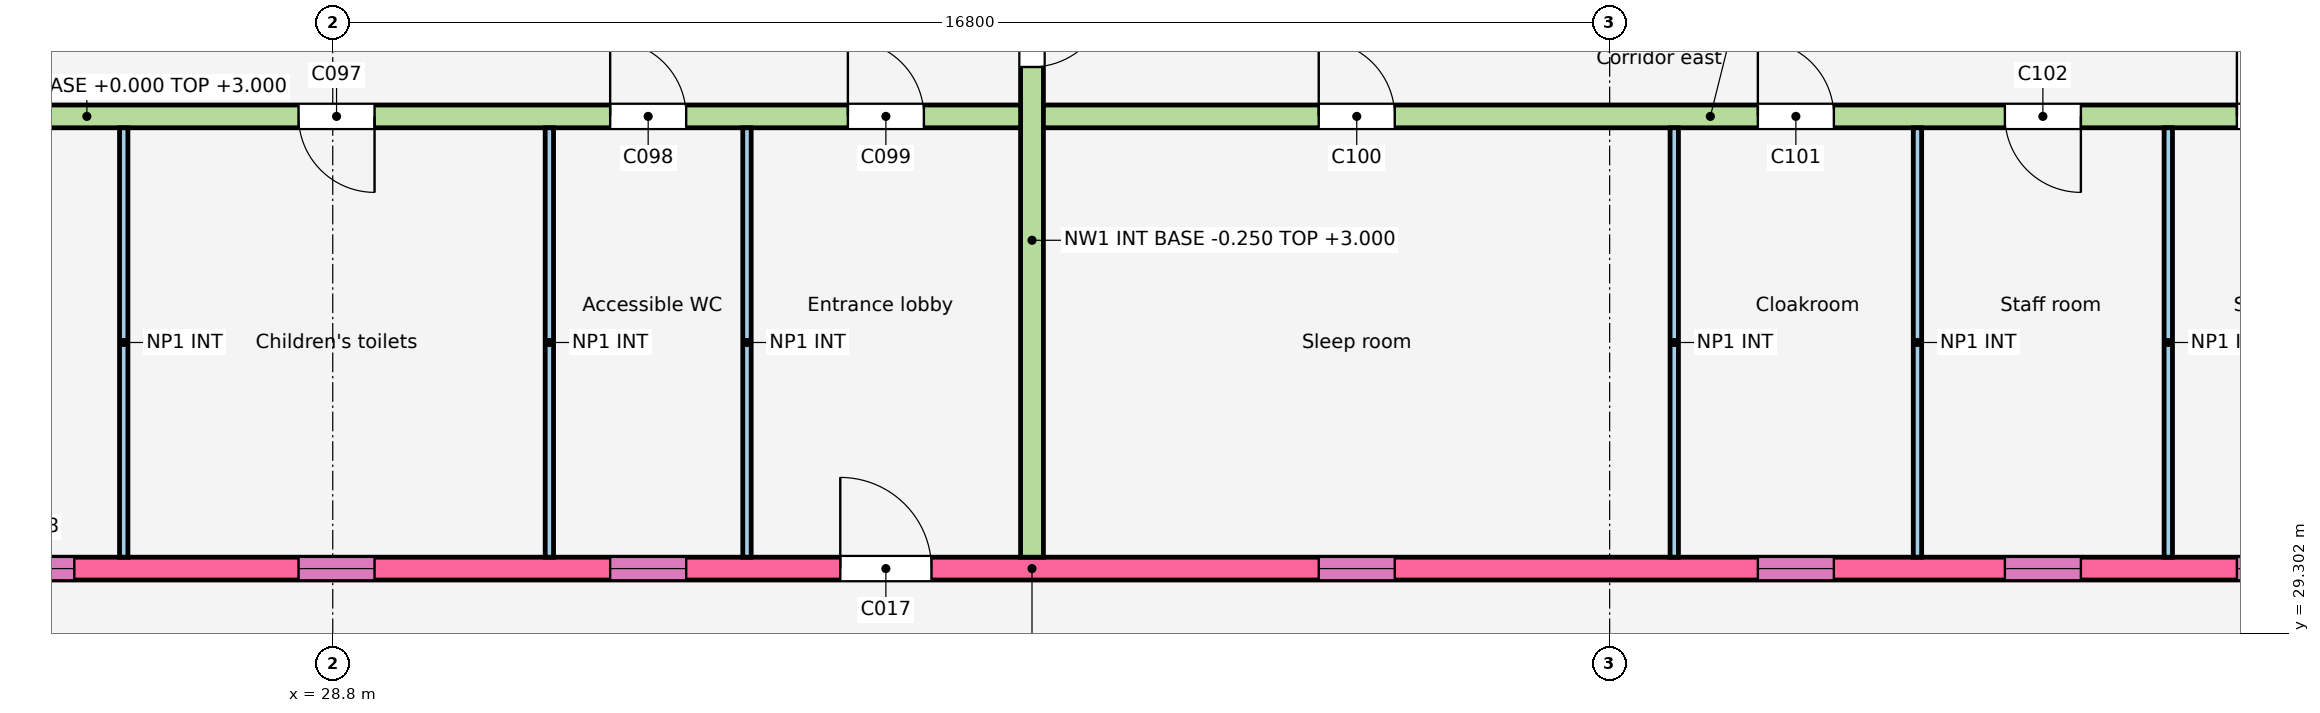
"""IFC4 building model, lengths in metres.
Left out: names, types, materials, properties, quantities, classifications, styles, units other than length and angle.
Written with IfcOpenShell. Run it as: python <this file> out.ifc"""

import sys

from ifc_helpers import new_model, si_unit, direction, frame, frame_2d, origin, place, context, subcontext, project, spatial, polyline, rectangle, outline, extrude, element, fill, save


model = new_model("IFC4")
c1 = context("Model", 3, precision=1e-05, world=origin(), true_north=direction((0.0, 1.0)))
c2 = subcontext(c1, "Body", "Model", "MODEL_VIEW")
j1 = project(units=[si_unit("LENGTHUNIT", "METRE"), si_unit("PLANEANGLEUNIT", "RADIAN")], contexts=[c1])
p1 = place(None, origin())
s1 = spatial("IfcSite", under=j1, at=p1, CompositionType="ELEMENT")
p2 = place(p1, origin())
s2 = spatial("IfcBuilding", under=s1, at=p2, CompositionType="ELEMENT")
p3 = place(p2, origin())
s3 = spatial("IfcBuildingStorey", under=s2, at=p3, CompositionType="ELEMENT", Elevation=0.0)
p4 = place(p3, frame((20.0, 30.15, -0.25), z_axis=(0.0, 0.0, 1.0), x_axis=(1.0, 0.0, 0.0)))
e1 = element("IfcWall", 1, at=p4, inside=s3, PredefinedType="SOLIDWALL", context=c2, shape_type="SweptSolid", body=[
    extrude(outline(polyline([(0.0, 0.0), (36.0, 0.0), (36.0, 3.247), (35.85, 3.247), (27.425, 7.176), (26.425, 7.176), (18.0, 3.247), (9.575, 7.176), (8.575, 7.176), (0.15, 3.247), (0.0, 3.247), (0.0, 0.0)])), frame((0.0, 0.15, 0.0), z_axis=(0.0, -1.0, 0.0), x_axis=(1.0, 0.0, 0.0)), (0.0, 0.0, 1.0), 0.3),
])
p5 = place(p4, frame((2.0, 0.0, 0.25)))
e2 = element("IfcOpeningElement", 2, at=p5, cuts=e1, PredefinedType="OPENING", context=c2, shape_type="SweptSolid", body=[
    extrude(rectangle(XDim=1.0, YDim=2.1, at=frame_2d((0.5, 1.05))), frame((0.0, 0.16, 0.0), z_axis=(0.0, -1.0, 0.0), x_axis=(1.0, 0.0, 0.0)), (0.0, 0.0, 1.0), 0.32),
])
p6 = place(p4, frame((4.4, 0.0, 1.45)))
e3 = element("IfcOpeningElement", 3, at=p6, cuts=e1, PredefinedType="OPENING", context=c2, shape_type="SweptSolid", body=[
    extrude(rectangle(XDim=1.0, YDim=0.9, at=frame_2d((0.5, 0.45))), frame((0.0, 0.16, 0.0), z_axis=(0.0, -1.0, 0.0), x_axis=(1.0, 0.0, 0.0)), (0.0, 0.0, 1.0), 0.32),
])
p7 = place(p4, frame((8.35, 0.0, 1.45)))
e4 = element("IfcOpeningElement", 4, at=p7, cuts=e1, PredefinedType="OPENING", context=c2, shape_type="SweptSolid", body=[
    extrude(rectangle(XDim=1.0, YDim=0.9, at=frame_2d((0.5, 0.45))), frame((0.0, 0.16, 0.0), z_axis=(0.0, -1.0, 0.0), x_axis=(1.0, 0.0, 0.0)), (0.0, 0.0, 1.0), 0.32),
])
p8 = place(p4, frame((12.45, 0.0, 1.45)))
e5 = element("IfcOpeningElement", 5, at=p8, cuts=e1, PredefinedType="OPENING", context=c2, shape_type="SweptSolid", body=[
    extrude(rectangle(XDim=1.0, YDim=0.9, at=frame_2d((0.5, 0.45))), frame((0.0, 0.16, 0.0), z_axis=(0.0, -1.0, 0.0), x_axis=(1.0, 0.0, 0.0)), (0.0, 0.0, 1.0), 0.32),
])
p9 = place(p4, frame((15.478, 0.0, 0.25)))
e6 = element("IfcOpeningElement", 6, at=p9, cuts=e1, PredefinedType="OPENING", context=c2, shape_type="SweptSolid", body=[
    extrude(rectangle(XDim=1.2, YDim=2.1, at=frame_2d((0.6, 1.05))), frame((0.0, 0.16, 0.0), z_axis=(0.0, -1.0, 0.0), x_axis=(1.0, 0.0, 0.0)), (0.0, 0.0, 1.0), 0.32),
])
p10 = place(p4, frame((21.772, 0.0, 1.45)))
e7 = element("IfcOpeningElement", 7, at=p10, cuts=e1, PredefinedType="OPENING", context=c2, shape_type="SweptSolid", body=[
    extrude(rectangle(XDim=1.0, YDim=0.9, at=frame_2d((0.5, 0.45))), frame((0.0, 0.16, 0.0), z_axis=(0.0, -1.0, 0.0), x_axis=(1.0, 0.0, 0.0)), (0.0, 0.0, 1.0), 0.32),
])
p11 = place(p4, frame((27.55, 0.0, 1.45)))
e8 = element("IfcOpeningElement", 8, at=p11, cuts=e1, PredefinedType="OPENING", context=c2, shape_type="SweptSolid", body=[
    extrude(rectangle(XDim=1.0, YDim=0.9, at=frame_2d((0.5, 0.45))), frame((0.0, 0.16, 0.0), z_axis=(0.0, -1.0, 0.0), x_axis=(1.0, 0.0, 0.0)), (0.0, 0.0, 1.0), 0.32),
])
p12 = place(p4, frame((30.8, 0.0, 1.45)))
e9 = element("IfcOpeningElement", 9, at=p12, cuts=e1, PredefinedType="OPENING", context=c2, shape_type="SweptSolid", body=[
    extrude(rectangle(XDim=1.0, YDim=0.9, at=frame_2d((0.5, 0.45))), frame((0.0, 0.16, 0.0), z_axis=(0.0, -1.0, 0.0), x_axis=(1.0, 0.0, 0.0)), (0.0, 0.0, 1.0), 0.32),
])
p13 = place(p4, frame((33.853, 0.0, 1.45)))
e10 = element("IfcOpeningElement", 10, at=p13, cuts=e1, PredefinedType="OPENING", context=c2, shape_type="SweptSolid", body=[
    extrude(rectangle(XDim=1.0, YDim=0.9, at=frame_2d((0.5, 0.45))), frame((0.0, 0.16, 0.0), z_axis=(0.0, -1.0, 0.0), x_axis=(1.0, 0.0, 0.0)), (0.0, 0.0, 1.0), 0.32),
])
p14 = place(p3, frame((38.0, 30.3, -0.25), z_axis=(0.0, 0.0, 1.0), x_axis=(0.0, 1.0, 0.0)))
e11 = element("IfcWall", 11, at=p14, inside=s3, PredefinedType="SOLIDWALL", context=c2, shape_type="SweptSolid", body=[
    extrude(rectangle(XDim=13.9, YDim=0.3, at=frame_2d((6.95, 0.0))), origin(), (0.0, 0.0, 1.0), 3.25),
])
p15 = place(p14, frame((6.45, 0.0, 0.25)))
e12 = element("IfcOpeningElement", 12, at=p15, cuts=e11, PredefinedType="OPENING", context=c2, shape_type="SweptSolid", body=[
    extrude(rectangle(XDim=1.0, YDim=2.1, at=frame_2d((0.5, 1.05))), frame((0.0, 0.16, 0.0), z_axis=(0.0, -1.0, 0.0), x_axis=(1.0, 0.0, 0.0)), (0.0, 0.0, 1.0), 0.32),
])
p16 = place(p3, frame((20.3, 36.1, 0.0), z_axis=(0.0, 0.0, 1.0), x_axis=(1.0, 0.0, 0.0)))
e13 = element("IfcWall", 13, at=p16, inside=s3, PredefinedType="SOLIDWALL", context=c2, shape_type="SweptSolid", body=[
    extrude(rectangle(XDim=17.55, YDim=0.3, at=frame_2d((8.775, 0.0))), origin(), (0.0, 0.0, 1.0), 3.0),
])
p17 = place(p16, frame((2.347, 0.0, 0.0)))
e14 = element("IfcOpeningElement", 14, at=p17, cuts=e13, PredefinedType="OPENING", context=c2, shape_type="SweptSolid", body=[
    extrude(rectangle(XDim=1.0, YDim=2.1, at=frame_2d((0.5, 1.05))), frame((0.0, 0.16, 0.0), z_axis=(0.0, -1.0, 0.0), x_axis=(1.0, 0.0, 0.0)), (0.0, 0.0, 1.0), 0.32),
])
p18 = place(p16, frame((8.05, 0.0, 0.0)))
e15 = element("IfcOpeningElement", 15, at=p18, cuts=e13, PredefinedType="OPENING", context=c2, shape_type="SweptSolid", body=[
    extrude(rectangle(XDim=1.0, YDim=2.1, at=frame_2d((0.5, 1.05))), frame((0.0, 0.16, 0.0), z_axis=(0.0, -1.0, 0.0), x_axis=(1.0, 0.0, 0.0)), (0.0, 0.0, 1.0), 0.32),
])
p19 = place(p16, frame((12.15, 0.0, 0.0)))
e16 = element("IfcOpeningElement", 16, at=p19, cuts=e13, PredefinedType="OPENING", context=c2, shape_type="SweptSolid", body=[
    extrude(rectangle(XDim=1.0, YDim=2.1, at=frame_2d((0.5, 1.05))), frame((0.0, 0.16, 0.0), z_axis=(0.0, -1.0, 0.0), x_axis=(1.0, 0.0, 0.0)), (0.0, 0.0, 1.0), 0.32),
])
p20 = place(p16, frame((15.278, 0.0, 0.0)))
e17 = element("IfcOpeningElement", 17, at=p20, cuts=e13, PredefinedType="OPENING", context=c2, shape_type="SweptSolid", body=[
    extrude(rectangle(XDim=1.0, YDim=2.1, at=frame_2d((0.5, 1.05))), frame((0.0, 0.16, 0.0), z_axis=(0.0, -1.0, 0.0), x_axis=(1.0, 0.0, 0.0)), (0.0, 0.0, 1.0), 0.32),
])
p21 = place(p3, frame((38.15, 36.1, 0.0), z_axis=(0.0, 0.0, 1.0), x_axis=(1.0, 0.0, 0.0)))
e18 = element("IfcWall", 18, at=p21, inside=s3, PredefinedType="SOLIDWALL", context=c2, shape_type="SweptSolid", body=[
    extrude(rectangle(XDim=17.55, YDim=0.3, at=frame_2d((8.775, 0.0))), origin(), (0.0, 0.0, 1.0), 3.0),
])
p22 = place(p21, frame((3.623, 0.0, 0.0)))
e19 = element("IfcOpeningElement", 19, at=p22, cuts=e18, PredefinedType="OPENING", context=c2, shape_type="SweptSolid", body=[
    extrude(rectangle(XDim=1.0, YDim=2.1, at=frame_2d((0.5, 1.05))), frame((0.0, 0.16, 0.0), z_axis=(0.0, -1.0, 0.0), x_axis=(1.0, 0.0, 0.0)), (0.0, 0.0, 1.0), 0.32),
])
p23 = place(p21, frame((9.4, 0.0, 0.0)))
e20 = element("IfcOpeningElement", 20, at=p23, cuts=e18, PredefinedType="OPENING", context=c2, shape_type="SweptSolid", body=[
    extrude(rectangle(XDim=1.0, YDim=2.1, at=frame_2d((0.5, 1.05))), frame((0.0, 0.16, 0.0), z_axis=(0.0, -1.0, 0.0), x_axis=(1.0, 0.0, 0.0)), (0.0, 0.0, 1.0), 0.32),
])
p24 = place(p21, frame((12.65, 0.0, 0.0)))
e21 = element("IfcOpeningElement", 21, at=p24, cuts=e18, PredefinedType="OPENING", context=c2, shape_type="SweptSolid", body=[
    extrude(rectangle(XDim=1.0, YDim=2.1, at=frame_2d((0.5, 1.05))), frame((0.0, 0.16, 0.0), z_axis=(0.0, -1.0, 0.0), x_axis=(1.0, 0.0, 0.0)), (0.0, 0.0, 1.0), 0.32),
])
p25 = place(p21, frame((15.702, 0.0, 0.0)))
e22 = element("IfcOpeningElement", 22, at=p25, cuts=e18, PredefinedType="OPENING", context=c2, shape_type="SweptSolid", body=[
    extrude(rectangle(XDim=1.0, YDim=2.1, at=frame_2d((0.5, 1.05))), frame((0.0, 0.16, 0.0), z_axis=(0.0, -1.0, 0.0), x_axis=(1.0, 0.0, 0.0)), (0.0, 0.0, 1.0), 0.32),
])
for number, where, z_axis, x_axis in (
    (23, (26.05, 30.3, 0.0), (0.0, 0.0, 1.0), (0.0, 1.0, 0.0)),
    (24, (31.65, 30.3, 0.0), (0.0, 0.0, 1.0), (0.0, 1.0, 0.0)),
    (25, (34.25, 30.3, 0.0), (0.0, 0.0, 1.0), (0.0, 1.0, 0.0)),
    (26, (46.45, 30.3, 0.0), (0.0, 0.0, 1.0), (0.0, 1.0, 0.0)),
    (27, (49.65, 30.3, 0.0), (0.0, 0.0, 1.0), (0.0, 1.0, 0.0)),
    (28, (52.95, 30.3, 0.0), (0.0, 0.0, 1.0), (0.0, 1.0, 0.0)),
):
    element("IfcWall", number, at=place(p3, frame(where, z_axis=z_axis, x_axis=x_axis)), inside=s3, PredefinedType="PARTITIONING", context=c2, shape_type="SweptSolid", body=[
        extrude(rectangle(XDim=5.65, YDim=0.11, at=frame_2d((2.825, 0.0))), origin(), (0.0, 0.0, 1.0), 3.0),
    ])
p26 = place(p6, origin())
e29 = element("IfcWindow", 29, at=p26, inside=s3, PartitioningType="SINGLE_PANEL", PredefinedType="WINDOW", context=c2, shape_type="SweptSolid", body=[
    extrude(rectangle(XDim=1.0, YDim=0.9, at=frame_2d((0.5, 0.45))), frame((0.0, 0.03, 0.0), z_axis=(0.0, -1.0, 0.0), x_axis=(1.0, 0.0, 0.0)), (0.0, 0.0, 1.0), 0.06),
])
fill(e3, e29)
p27 = place(p7, origin())
e30 = element("IfcWindow", 30, at=p27, inside=s3, PartitioningType="SINGLE_PANEL", PredefinedType="WINDOW", context=c2, shape_type="SweptSolid", body=[
    extrude(rectangle(XDim=1.0, YDim=0.9, at=frame_2d((0.5, 0.45))), frame((0.0, 0.03, 0.0), z_axis=(0.0, -1.0, 0.0), x_axis=(1.0, 0.0, 0.0)), (0.0, 0.0, 1.0), 0.06),
])
fill(e4, e30)
p28 = place(p8, origin())
e31 = element("IfcWindow", 31, at=p28, inside=s3, PartitioningType="SINGLE_PANEL", PredefinedType="WINDOW", context=c2, shape_type="SweptSolid", body=[
    extrude(rectangle(XDim=1.0, YDim=0.9, at=frame_2d((0.5, 0.45))), frame((0.0, 0.03, 0.0), z_axis=(0.0, -1.0, 0.0), x_axis=(1.0, 0.0, 0.0)), (0.0, 0.0, 1.0), 0.06),
])
fill(e5, e31)
p29 = place(p9, origin())
e32 = element("IfcDoor", 32, at=p29, inside=s3, OperationType="SINGLE_SWING_LEFT", PredefinedType="DOOR", context=c2, shape_type="SweptSolid", body=[
    extrude(rectangle(XDim=1.2, YDim=2.1, at=frame_2d((0.6, 1.05))), frame((0.0, 0.025, 0.0), z_axis=(0.0, -1.0, 0.0), x_axis=(1.0, 0.0, 0.0)), (0.0, 0.0, 1.0), 0.05),
])
fill(e6, e32)
p30 = place(p10, origin())
e33 = element("IfcWindow", 33, at=p30, inside=s3, PartitioningType="SINGLE_PANEL", PredefinedType="WINDOW", context=c2, shape_type="SweptSolid", body=[
    extrude(rectangle(XDim=1.0, YDim=0.9, at=frame_2d((0.5, 0.45))), frame((0.0, 0.03, 0.0), z_axis=(0.0, -1.0, 0.0), x_axis=(1.0, 0.0, 0.0)), (0.0, 0.0, 1.0), 0.06),
])
fill(e7, e33)
p31 = place(p11, origin())
e34 = element("IfcWindow", 34, at=p31, inside=s3, PartitioningType="SINGLE_PANEL", PredefinedType="WINDOW", context=c2, shape_type="SweptSolid", body=[
    extrude(rectangle(XDim=1.0, YDim=0.9, at=frame_2d((0.5, 0.45))), frame((0.0, 0.03, 0.0), z_axis=(0.0, -1.0, 0.0), x_axis=(1.0, 0.0, 0.0)), (0.0, 0.0, 1.0), 0.06),
])
fill(e8, e34)
p32 = place(p12, origin())
e35 = element("IfcWindow", 35, at=p32, inside=s3, PartitioningType="SINGLE_PANEL", PredefinedType="WINDOW", context=c2, shape_type="SweptSolid", body=[
    extrude(rectangle(XDim=1.0, YDim=0.9, at=frame_2d((0.5, 0.45))), frame((0.0, 0.03, 0.0), z_axis=(0.0, -1.0, 0.0), x_axis=(1.0, 0.0, 0.0)), (0.0, 0.0, 1.0), 0.06),
])
fill(e9, e35)
p33 = place(p13, origin())
e36 = element("IfcWindow", 36, at=p33, inside=s3, PartitioningType="SINGLE_PANEL", PredefinedType="WINDOW", context=c2, shape_type="SweptSolid", body=[
    extrude(rectangle(XDim=1.0, YDim=0.9, at=frame_2d((0.5, 0.45))), frame((0.0, 0.03, 0.0), z_axis=(0.0, -1.0, 0.0), x_axis=(1.0, 0.0, 0.0)), (0.0, 0.0, 1.0), 0.06),
])
fill(e10, e36)
p34 = place(p18, origin())
e37 = element("IfcDoor", 37, at=p34, inside=s3, OperationType="SINGLE_SWING_RIGHT", PredefinedType="DOOR", context=c2, shape_type="SweptSolid", body=[
    extrude(rectangle(XDim=1.0, YDim=2.1, at=frame_2d((0.5, 1.05))), frame((0.0, 0.025, 0.0), z_axis=(0.0, -1.0, 0.0), x_axis=(1.0, 0.0, 0.0)), (0.0, 0.0, 1.0), 0.05),
])
fill(e15, e37)
p35 = place(p19, origin())
e38 = element("IfcDoor", 38, at=p35, inside=s3, OperationType="SINGLE_SWING_LEFT", PredefinedType="DOOR", context=c2, shape_type="SweptSolid", body=[
    extrude(rectangle(XDim=1.0, YDim=2.1, at=frame_2d((0.5, 1.05))), frame((0.0, 0.025, 0.0), z_axis=(0.0, -1.0, 0.0), x_axis=(1.0, 0.0, 0.0)), (0.0, 0.0, 1.0), 0.05),
])
fill(e16, e38)
p36 = place(p20, origin())
e39 = element("IfcDoor", 39, at=p36, inside=s3, OperationType="SINGLE_SWING_LEFT", PredefinedType="DOOR", context=c2, shape_type="SweptSolid", body=[
    extrude(rectangle(XDim=1.0, YDim=2.1, at=frame_2d((0.5, 1.05))), frame((0.0, 0.025, 0.0), z_axis=(0.0, -1.0, 0.0), x_axis=(1.0, 0.0, 0.0)), (0.0, 0.0, 1.0), 0.05),
])
fill(e17, e39)
p37 = place(p22, origin())
e40 = element("IfcDoor", 40, at=p37, inside=s3, OperationType="SINGLE_SWING_LEFT", PredefinedType="DOOR", context=c2, shape_type="SweptSolid", body=[
    extrude(rectangle(XDim=1.0, YDim=2.1, at=frame_2d((0.5, 1.05))), frame((0.0, 0.025, 0.0), z_axis=(0.0, -1.0, 0.0), x_axis=(1.0, 0.0, 0.0)), (0.0, 0.0, 1.0), 0.05),
])
fill(e19, e40)
p38 = place(p23, origin())
e41 = element("IfcDoor", 41, at=p38, inside=s3, OperationType="SINGLE_SWING_LEFT", PredefinedType="DOOR", context=c2, shape_type="SweptSolid", body=[
    extrude(rectangle(XDim=1.0, YDim=2.1, at=frame_2d((0.5, 1.05))), frame((0.0, 0.025, 0.0), z_axis=(0.0, -1.0, 0.0), x_axis=(1.0, 0.0, 0.0)), (0.0, 0.0, 1.0), 0.05),
])
fill(e20, e41)
p39 = place(p24, origin())
e42 = element("IfcDoor", 42, at=p39, inside=s3, OperationType="SINGLE_SWING_RIGHT", PredefinedType="DOOR", context=c2, shape_type="SweptSolid", body=[
    extrude(rectangle(XDim=1.0, YDim=2.1, at=frame_2d((0.5, 1.05))), frame((0.0, 0.025, 0.0), z_axis=(0.0, -1.0, 0.0), x_axis=(1.0, 0.0, 0.0)), (0.0, 0.0, 1.0), 0.05),
])
fill(e21, e42)
p40 = place(p25, origin())
e43 = element("IfcDoor", 43, at=p40, inside=s3, OperationType="SINGLE_SWING_LEFT", PredefinedType="DOOR", context=c2, shape_type="SweptSolid", body=[
    extrude(rectangle(XDim=1.0, YDim=2.1, at=frame_2d((0.5, 1.05))), frame((0.0, 0.025, 0.0), z_axis=(0.0, -1.0, 0.0), x_axis=(1.0, 0.0, 0.0)), (0.0, 0.0, 1.0), 0.05),
])
fill(e22, e43)
p41 = place(p15, origin())
e44 = element("IfcDoor", 44, at=p41, inside=s3, OperationType="SINGLE_SWING_RIGHT", PredefinedType="DOOR", context=c2, shape_type="SweptSolid", body=[
    extrude(rectangle(XDim=1.0, YDim=2.1, at=frame_2d((0.5, 1.05))), frame((0.0, 0.025, 0.0), z_axis=(0.0, -1.0, 0.0), x_axis=(1.0, 0.0, 0.0)), (0.0, 0.0, 1.0), 0.05),
])
fill(e12, e44)
save(model, sys.argv[1])
